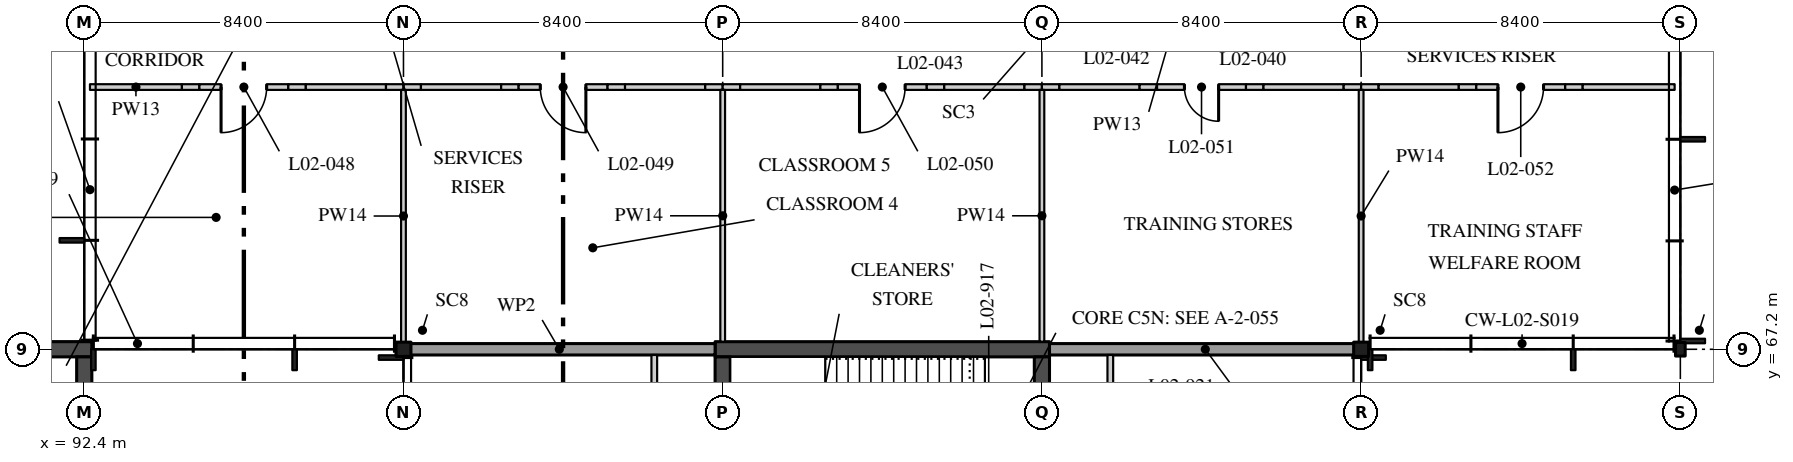
"""IFC4 building model, lengths in metres.
Left out: names, types, materials, properties, quantities, classifications, styles, units other than length and angle.
Written with IfcOpenShell. Run it as: python <this file> out.ifc"""

import sys

from ifc_helpers import new_model, si_unit, direction, frame, frame_2d, origin, origin_2d, place, context, subcontext, project, spatial, rectangle, i_section, extrude, element, fill, save


model = new_model("IFC4")
c1 = context("Model", 3, precision=1e-05, world=origin(), true_north=direction((0.0, 1.0)))
c2 = subcontext(c1, "Body", "Model", "MODEL_VIEW")
j1 = project(units=[si_unit("LENGTHUNIT", "METRE"), si_unit("PLANEANGLEUNIT", "RADIAN")], contexts=[c1])
p1 = place(None, origin())
s1 = spatial("IfcSite", under=j1, at=p1, CompositionType="ELEMENT")
p2 = place(p1, origin())
s2 = spatial("IfcBuilding", under=s1, at=p2, CompositionType="ELEMENT")
p3 = place(p2, frame((0.0, 0.0, 9.9)))
s3 = spatial("IfcBuildingStorey", under=s2, at=p3, CompositionType="ELEMENT", Elevation=9.9)
for number, where, z_axis, x_axis in (
    (1, (100.8, 67.2, 0.0), (0.0, 0.0, 1.0), (1.0, 0.0, 0.0)),
    (2, (126.0, 67.2, 0.0), (0.0, 0.0, 1.0), (1.0, 0.0, 0.0)),
):
    element("IfcColumn", number, at=place(p3, frame(where, z_axis=z_axis, x_axis=x_axis)), inside=s3, PredefinedType="COLUMN", context=c2, shape_type="SweptSolid", body=[
        extrude(i_section(OverallWidth=0.394, OverallDepth=0.376, WebThickness=0.017, FlangeThickness=0.028, FilletRadius=0.015, at=origin_2d()), origin(), (0.0, 0.0, 1.0), 4.37),
    ])
p4 = place(p3, frame((134.4, 67.2, 0.0), z_axis=(0.0, 0.0, 1.0), x_axis=(1.0, 0.0, 0.0)))
e3 = element("IfcColumn", 3, at=p4, inside=s3, PredefinedType="COLUMN", context=c2, shape_type="SweptSolid", body=[
    extrude(i_section(OverallWidth=0.254, OverallDepth=0.356, WebThickness=0.01, FlangeThickness=0.018, FilletRadius=0.015, at=origin_2d()), origin(), (0.0, 0.0, 1.0), 4.37),
])
p5 = place(p3, frame((83.8, 67.2, 0.0), z_axis=(0.0, 0.0, 1.0), x_axis=(1.0, 0.0, 0.0)))
e4 = element("IfcWall", 4, at=p5, inside=s3, PredefinedType="SHEAR", context=c2, shape_type="SweptSolid", body=[
    extrude(rectangle(XDim=8.8, YDim=0.4, at=frame_2d((4.4, 0.0))), origin(), (0.0, 0.0, 1.0), 4.5),
])
p6 = place(p3, frame((92.4, 59.0, 0.0), z_axis=(0.0, 0.0, 1.0), x_axis=(0.0, 1.0, 0.0)))
e5 = element("IfcWall", 5, at=p6, inside=s3, PredefinedType="SHEAR", context=c2, shape_type="SweptSolid", body=[
    extrude(rectangle(XDim=8.0, YDim=0.4, at=frame_2d((4.0, 0.0))), origin(), (0.0, 0.0, 1.0), 4.5),
])
p7 = place(p3, frame((109.0, 67.2, 0.0), z_axis=(0.0, 0.0, 1.0), x_axis=(1.0, 0.0, 0.0)))
e6 = element("IfcWall", 6, at=p7, inside=s3, PredefinedType="SHEAR", context=c2, shape_type="SweptSolid", body=[
    extrude(rectangle(XDim=8.8, YDim=0.4, at=frame_2d((4.4, 0.0))), origin(), (0.0, 0.0, 1.0), 4.37),
])
p8 = place(p3, frame((109.2, 59.0, 0.0), z_axis=(0.0, 0.0, 1.0), x_axis=(0.0, 1.0, 0.0)))
e7 = element("IfcWall", 7, at=p8, inside=s3, PredefinedType="SHEAR", context=c2, shape_type="SweptSolid", body=[
    extrude(rectangle(XDim=8.0, YDim=0.4, at=frame_2d((4.0, 0.0))), origin(), (0.0, 0.0, 1.0), 4.37),
])
p9 = place(p8, frame((2.925, 0.0, 0.0)))
e8 = element("IfcOpeningElement", 8, at=p9, cuts=e7, PredefinedType="OPENING", context=c2, shape_type="SweptSolid", body=[
    extrude(rectangle(XDim=1.2, YDim=2.1, at=frame_2d((0.6, 1.05))), frame((0.0, 0.21, 0.0), z_axis=(0.0, -1.0, 0.0), x_axis=(1.0, 0.0, 0.0)), (0.0, 0.0, 1.0), 0.42),
])
p10 = place(p3, frame((117.6, 59.0, 0.0), z_axis=(0.0, 0.0, 1.0), x_axis=(0.0, 1.0, 0.0)))
e9 = element("IfcWall", 9, at=p10, inside=s3, PredefinedType="SHEAR", context=c2, shape_type="SweptSolid", body=[
    extrude(rectangle(XDim=8.0, YDim=0.4, at=frame_2d((4.0, 0.0))), origin(), (0.0, 0.0, 1.0), 4.37),
])
p11 = place(p10, frame((2.925, 0.0, 0.0)))
e10 = element("IfcOpeningElement", 10, at=p11, cuts=e9, PredefinedType="OPENING", context=c2, shape_type="SweptSolid", body=[
    extrude(rectangle(XDim=1.2, YDim=2.1, at=frame_2d((0.6, 1.05))), frame((0.0, 0.21, 0.0), z_axis=(0.0, -1.0, 0.0), x_axis=(1.0, 0.0, 0.0)), (0.0, 0.0, 1.0), 0.42),
])
p12 = place(p3, frame((119.4, 59.03, 0.0), z_axis=(0.0, 0.0, 1.0), x_axis=(0.0, 1.0, 0.0)))
e11 = element("IfcWall", 11, at=p12, inside=s3, PredefinedType="PARTITIONING", context=c2, shape_type="SweptSolid", body=[
    extrude(rectangle(XDim=8.02, YDim=0.15, at=frame_2d((4.01, 0.0))), origin(), (0.0, 0.0, 1.0), 4.37),
])
p13 = place(p12, frame((1.27, 0.0, 0.0)))
e12 = element("IfcOpeningElement", 12, at=p13, cuts=e11, PredefinedType="OPENING", context=c2, shape_type="SweptSolid", body=[
    extrude(rectangle(XDim=0.9, YDim=2.1, at=frame_2d((0.45, 1.05))), frame((0.0, 0.085, 0.0), z_axis=(0.0, -1.0, 0.0), x_axis=(1.0, 0.0, 0.0)), (0.0, 0.0, 1.0), 0.17),
])
p14 = place(p3, frame((107.4, 59.03, 0.0), z_axis=(0.0, 0.0, 1.0), x_axis=(0.0, 1.0, 0.0)))
e13 = element("IfcWall", 13, at=p14, inside=s3, PredefinedType="PARTITIONING", context=c2, shape_type="SweptSolid", body=[
    extrude(rectangle(XDim=8.02, YDim=0.15, at=frame_2d((4.01, 0.0))), origin(), (0.0, 0.0, 1.0), 4.37),
])
p15 = place(p3, frame((92.55, 74.1, 0.0), z_axis=(0.0, 0.0, 1.0), x_axis=(1.0, 0.0, 0.0)))
e14 = element("IfcWall", 14, at=p15, inside=s3, PredefinedType="PARTITIONING", context=c2, shape_type="SweptSolid", body=[
    extrude(rectangle(XDim=2.42, YDim=0.15, at=frame_2d((1.21, 0.0))), origin(), (0.0, 0.0, 1.0), 4.37),
])
p16 = place(p3, frame((94.97, 74.1, 0.0), z_axis=(0.0, 0.0, 1.0), x_axis=(1.0, 0.0, 0.0)))
e15 = element("IfcWall", 15, at=p16, inside=s3, PredefinedType="PARTITIONING", context=c2, shape_type="SweptSolid", body=[
    extrude(rectangle(XDim=0.46, YDim=0.15, at=frame_2d((0.23, 0.0))), origin(), (0.0, 0.0, 1.0), 3.895),
])
p17 = place(p3, frame((95.43, 74.1, 0.0), z_axis=(0.0, 0.0, 1.0), x_axis=(1.0, 0.0, 0.0)))
e16 = element("IfcWall", 16, at=p17, inside=s3, PredefinedType="PARTITIONING", context=c2, shape_type="SweptSolid", body=[
    extrude(rectangle(XDim=2.34, YDim=0.15, at=frame_2d((1.17, 0.0))), origin(), (0.0, 0.0, 1.0), 4.37),
])
p18 = place(p17, frame((0.57, 0.0, 0.0)))
e17 = element("IfcOpeningElement", 17, at=p18, cuts=e16, PredefinedType="OPENING", context=c2, shape_type="SweptSolid", body=[
    extrude(rectangle(XDim=1.2, YDim=2.4, at=frame_2d((0.6, 1.2))), frame((0.0, 0.085, 0.0), z_axis=(0.0, -1.0, 0.0), x_axis=(1.0, 0.0, 0.0)), (0.0, 0.0, 1.0), 0.17),
])
p19 = place(p3, frame((97.77, 74.1, 0.0), z_axis=(0.0, 0.0, 1.0), x_axis=(1.0, 0.0, 0.0)))
e18 = element("IfcWall", 18, at=p19, inside=s3, PredefinedType="PARTITIONING", context=c2, shape_type="SweptSolid", body=[
    extrude(rectangle(XDim=0.46, YDim=0.15, at=frame_2d((0.23, 0.0))), origin(), (0.0, 0.0, 1.0), 3.895),
])
p20 = place(p3, frame((98.23, 74.1, 0.0), z_axis=(0.0, 0.0, 1.0), x_axis=(1.0, 0.0, 0.0)))
e19 = element("IfcWall", 19, at=p20, inside=s3, PredefinedType="PARTITIONING", context=c2, shape_type="SweptSolid", body=[
    extrude(rectangle(XDim=2.11, YDim=0.15, at=frame_2d((1.055, 0.0))), origin(), (0.0, 0.0, 1.0), 4.37),
])
for number, where, z_axis, x_axis in (
    (20, (100.34, 74.1, 0.0), (0.0, 0.0, 1.0), (1.0, 0.0, 0.0)),
    (21, (100.8, 74.1, 0.0), (0.0, 0.0, 1.0), (1.0, 0.0, 0.0)),
):
    element("IfcWall", number, at=place(p3, frame(where, z_axis=z_axis, x_axis=x_axis)), inside=s3, PredefinedType="PARTITIONING", context=c2, shape_type="SweptSolid", body=[
        extrude(rectangle(XDim=0.46, YDim=0.15, at=frame_2d((0.23, 0.0))), origin(), (0.0, 0.0, 1.0), 3.746),
    ])
p21 = place(p3, frame((101.26, 74.1, 0.0), z_axis=(0.0, 0.0, 1.0), x_axis=(1.0, 0.0, 0.0)))
e22 = element("IfcWall", 22, at=p21, inside=s3, PredefinedType="PARTITIONING", context=c2, shape_type="SweptSolid", body=[
    extrude(rectangle(XDim=2.11, YDim=0.15, at=frame_2d((1.055, 0.0))), origin(), (0.0, 0.0, 1.0), 4.37),
])
p22 = place(p3, frame((103.37, 74.1, 0.0), z_axis=(0.0, 0.0, 1.0), x_axis=(1.0, 0.0, 0.0)))
e23 = element("IfcWall", 23, at=p22, inside=s3, PredefinedType="PARTITIONING", context=c2, shape_type="SweptSolid", body=[
    extrude(rectangle(XDim=0.46, YDim=0.15, at=frame_2d((0.23, 0.0))), origin(), (0.0, 0.0, 1.0), 3.895),
])
p23 = place(p3, frame((103.83, 74.1, 0.0), z_axis=(0.0, 0.0, 1.0), x_axis=(1.0, 0.0, 0.0)))
e24 = element("IfcWall", 24, at=p23, inside=s3, PredefinedType="PARTITIONING", context=c2, shape_type="SweptSolid", body=[
    extrude(rectangle(XDim=2.34, YDim=0.15, at=frame_2d((1.17, 0.0))), origin(), (0.0, 0.0, 1.0), 4.37),
])
p24 = place(p23, frame((0.57, 0.0, 0.0)))
e25 = element("IfcOpeningElement", 25, at=p24, cuts=e24, PredefinedType="OPENING", context=c2, shape_type="SweptSolid", body=[
    extrude(rectangle(XDim=1.2, YDim=2.4, at=frame_2d((0.6, 1.2))), frame((0.0, 0.085, 0.0), z_axis=(0.0, -1.0, 0.0), x_axis=(1.0, 0.0, 0.0)), (0.0, 0.0, 1.0), 0.17),
])
p25 = place(p3, frame((106.17, 74.1, 0.0), z_axis=(0.0, 0.0, 1.0), x_axis=(1.0, 0.0, 0.0)))
e26 = element("IfcWall", 26, at=p25, inside=s3, PredefinedType="PARTITIONING", context=c2, shape_type="SweptSolid", body=[
    extrude(rectangle(XDim=0.46, YDim=0.15, at=frame_2d((0.23, 0.0))), origin(), (0.0, 0.0, 1.0), 3.895),
])
p26 = place(p3, frame((106.63, 74.1, 0.0), z_axis=(0.0, 0.0, 1.0), x_axis=(1.0, 0.0, 0.0)))
e27 = element("IfcWall", 27, at=p26, inside=s3, PredefinedType="PARTITIONING", context=c2, shape_type="SweptSolid", body=[
    extrude(rectangle(XDim=2.11, YDim=0.15, at=frame_2d((1.055, 0.0))), origin(), (0.0, 0.0, 1.0), 4.37),
])
for number, where, z_axis, x_axis in (
    (28, (108.74, 74.1, 0.0), (0.0, 0.0, 1.0), (1.0, 0.0, 0.0)),
    (29, (109.2, 74.1, 0.0), (0.0, 0.0, 1.0), (1.0, 0.0, 0.0)),
):
    element("IfcWall", number, at=place(p3, frame(where, z_axis=z_axis, x_axis=x_axis)), inside=s3, PredefinedType="PARTITIONING", context=c2, shape_type="SweptSolid", body=[
        extrude(rectangle(XDim=0.46, YDim=0.15, at=frame_2d((0.23, 0.0))), origin(), (0.0, 0.0, 1.0), 3.746),
    ])
p27 = place(p3, frame((109.66, 74.1, 0.0), z_axis=(0.0, 0.0, 1.0), x_axis=(1.0, 0.0, 0.0)))
e30 = element("IfcWall", 30, at=p27, inside=s3, PredefinedType="PARTITIONING", context=c2, shape_type="SweptSolid", body=[
    extrude(rectangle(XDim=2.11, YDim=0.15, at=frame_2d((1.055, 0.0))), origin(), (0.0, 0.0, 1.0), 4.37),
])
p28 = place(p3, frame((111.77, 74.1, 0.0), z_axis=(0.0, 0.0, 1.0), x_axis=(1.0, 0.0, 0.0)))
e31 = element("IfcWall", 31, at=p28, inside=s3, PredefinedType="PARTITIONING", context=c2, shape_type="SweptSolid", body=[
    extrude(rectangle(XDim=0.46, YDim=0.15, at=frame_2d((0.23, 0.0))), origin(), (0.0, 0.0, 1.0), 3.895),
])
p29 = place(p3, frame((112.23, 74.1, 0.0), z_axis=(0.0, 0.0, 1.0), x_axis=(1.0, 0.0, 0.0)))
e32 = element("IfcWall", 32, at=p29, inside=s3, PredefinedType="PARTITIONING", context=c2, shape_type="SweptSolid", body=[
    extrude(rectangle(XDim=2.34, YDim=0.15, at=frame_2d((1.17, 0.0))), origin(), (0.0, 0.0, 1.0), 4.37),
])
p30 = place(p29, frame((0.57, 0.0, 0.0)))
e33 = element("IfcOpeningElement", 33, at=p30, cuts=e32, PredefinedType="OPENING", context=c2, shape_type="SweptSolid", body=[
    extrude(rectangle(XDim=1.2, YDim=2.4, at=frame_2d((0.6, 1.2))), frame((0.0, 0.085, 0.0), z_axis=(0.0, -1.0, 0.0), x_axis=(1.0, 0.0, 0.0)), (0.0, 0.0, 1.0), 0.17),
])
p31 = place(p3, frame((114.57, 74.1, 0.0), z_axis=(0.0, 0.0, 1.0), x_axis=(1.0, 0.0, 0.0)))
e34 = element("IfcWall", 34, at=p31, inside=s3, PredefinedType="PARTITIONING", context=c2, shape_type="SweptSolid", body=[
    extrude(rectangle(XDim=0.46, YDim=0.15, at=frame_2d((0.23, 0.0))), origin(), (0.0, 0.0, 1.0), 3.895),
])
p32 = place(p3, frame((115.03, 74.1, 0.0), z_axis=(0.0, 0.0, 1.0), x_axis=(1.0, 0.0, 0.0)))
e35 = element("IfcWall", 35, at=p32, inside=s3, PredefinedType="PARTITIONING", context=c2, shape_type="SweptSolid", body=[
    extrude(rectangle(XDim=2.11, YDim=0.15, at=frame_2d((1.055, 0.0))), origin(), (0.0, 0.0, 1.0), 4.37),
])
p33 = place(p3, frame((117.14, 74.1, 0.0), z_axis=(0.0, 0.0, 1.0), x_axis=(1.0, 0.0, 0.0)))
e36 = element("IfcWall", 36, at=p33, inside=s3, PredefinedType="PARTITIONING", context=c2, shape_type="SweptSolid", body=[
    extrude(rectangle(XDim=0.46, YDim=0.15, at=frame_2d((0.23, 0.0))), origin(), (0.0, 0.0, 1.0), 3.746),
])
p34 = place(p3, frame((117.6, 74.1, 0.0), z_axis=(0.0, 0.0, 1.0), x_axis=(1.0, 0.0, 0.0)))
e37 = element("IfcWall", 37, at=p34, inside=s3, PredefinedType="PARTITIONING", context=c2, shape_type="SweptSolid", body=[
    extrude(rectangle(XDim=0.46, YDim=0.15, at=frame_2d((0.23, 0.0))), origin(), (0.0, 0.0, 1.0), 3.746),
])
p35 = place(p3, frame((118.06, 74.1, 0.0), z_axis=(0.0, 0.0, 1.0), x_axis=(1.0, 0.0, 0.0)))
e38 = element("IfcWall", 38, at=p35, inside=s3, PredefinedType="PARTITIONING", context=c2, shape_type="SweptSolid", body=[
    extrude(rectangle(XDim=2.11, YDim=0.15, at=frame_2d((1.055, 0.0))), origin(), (0.0, 0.0, 1.0), 4.37),
])
p36 = place(p3, frame((120.17, 74.1, 0.0), z_axis=(0.0, 0.0, 1.0), x_axis=(1.0, 0.0, 0.0)))
e39 = element("IfcWall", 39, at=p36, inside=s3, PredefinedType="PARTITIONING", context=c2, shape_type="SweptSolid", body=[
    extrude(rectangle(XDim=0.46, YDim=0.15, at=frame_2d((0.23, 0.0))), origin(), (0.0, 0.0, 1.0), 3.895),
])
p37 = place(p3, frame((120.63, 74.1, 0.0), z_axis=(0.0, 0.0, 1.0), x_axis=(1.0, 0.0, 0.0)))
e40 = element("IfcWall", 40, at=p37, inside=s3, PredefinedType="PARTITIONING", context=c2, shape_type="SweptSolid", body=[
    extrude(rectangle(XDim=2.34, YDim=0.15, at=frame_2d((1.17, 0.0))), origin(), (0.0, 0.0, 1.0), 4.37),
])
p38 = place(p37, frame((0.72, 0.0, 0.0)))
e41 = element("IfcOpeningElement", 41, at=p38, cuts=e40, PredefinedType="OPENING", context=c2, shape_type="SweptSolid", body=[
    extrude(rectangle(XDim=0.9, YDim=2.1, at=frame_2d((0.45, 1.05))), frame((0.0, 0.085, 0.0), z_axis=(0.0, -1.0, 0.0), x_axis=(1.0, 0.0, 0.0)), (0.0, 0.0, 1.0), 0.17),
])
p39 = place(p3, frame((122.97, 74.1, 0.0), z_axis=(0.0, 0.0, 1.0), x_axis=(1.0, 0.0, 0.0)))
e42 = element("IfcWall", 42, at=p39, inside=s3, PredefinedType="PARTITIONING", context=c2, shape_type="SweptSolid", body=[
    extrude(rectangle(XDim=0.46, YDim=0.15, at=frame_2d((0.23, 0.0))), origin(), (0.0, 0.0, 1.0), 3.895),
])
p40 = place(p3, frame((123.43, 74.1, 0.0), z_axis=(0.0, 0.0, 1.0), x_axis=(1.0, 0.0, 0.0)))
e43 = element("IfcWall", 43, at=p40, inside=s3, PredefinedType="PARTITIONING", context=c2, shape_type="SweptSolid", body=[
    extrude(rectangle(XDim=2.11, YDim=0.15, at=frame_2d((1.055, 0.0))), origin(), (0.0, 0.0, 1.0), 4.37),
])
for number, where, z_axis, x_axis in (
    (44, (125.54, 74.1, 0.0), (0.0, 0.0, 1.0), (1.0, 0.0, 0.0)),
    (45, (126.0, 74.1, 0.0), (0.0, 0.0, 1.0), (1.0, 0.0, 0.0)),
):
    element("IfcWall", number, at=place(p3, frame(where, z_axis=z_axis, x_axis=x_axis)), inside=s3, PredefinedType="PARTITIONING", context=c2, shape_type="SweptSolid", body=[
        extrude(rectangle(XDim=0.46, YDim=0.15, at=frame_2d((0.23, 0.0))), origin(), (0.0, 0.0, 1.0), 3.746),
    ])
p41 = place(p3, frame((126.46, 74.1, 0.0), z_axis=(0.0, 0.0, 1.0), x_axis=(1.0, 0.0, 0.0)))
e46 = element("IfcWall", 46, at=p41, inside=s3, PredefinedType="PARTITIONING", context=c2, shape_type="SweptSolid", body=[
    extrude(rectangle(XDim=2.11, YDim=0.15, at=frame_2d((1.055, 0.0))), origin(), (0.0, 0.0, 1.0), 4.37),
])
p42 = place(p3, frame((128.57, 74.1, 0.0), z_axis=(0.0, 0.0, 1.0), x_axis=(1.0, 0.0, 0.0)))
e47 = element("IfcWall", 47, at=p42, inside=s3, PredefinedType="PARTITIONING", context=c2, shape_type="SweptSolid", body=[
    extrude(rectangle(XDim=0.46, YDim=0.15, at=frame_2d((0.23, 0.0))), origin(), (0.0, 0.0, 1.0), 3.895),
])
p43 = place(p3, frame((129.03, 74.1, 0.0), z_axis=(0.0, 0.0, 1.0), x_axis=(1.0, 0.0, 0.0)))
e48 = element("IfcWall", 48, at=p43, inside=s3, PredefinedType="PARTITIONING", context=c2, shape_type="SweptSolid", body=[
    extrude(rectangle(XDim=2.34, YDim=0.15, at=frame_2d((1.17, 0.0))), origin(), (0.0, 0.0, 1.0), 4.37),
])
p44 = place(p43, frame((0.57, 0.0, 0.0)))
e49 = element("IfcOpeningElement", 49, at=p44, cuts=e48, PredefinedType="OPENING", context=c2, shape_type="SweptSolid", body=[
    extrude(rectangle(XDim=1.2, YDim=2.4, at=frame_2d((0.6, 1.2))), frame((0.0, 0.085, 0.0), z_axis=(0.0, -1.0, 0.0), x_axis=(1.0, 0.0, 0.0)), (0.0, 0.0, 1.0), 0.17),
])
p45 = place(p3, frame((131.37, 74.1, 0.0), z_axis=(0.0, 0.0, 1.0), x_axis=(1.0, 0.0, 0.0)))
e50 = element("IfcWall", 50, at=p45, inside=s3, PredefinedType="PARTITIONING", context=c2, shape_type="SweptSolid", body=[
    extrude(rectangle(XDim=0.46, YDim=0.15, at=frame_2d((0.23, 0.0))), origin(), (0.0, 0.0, 1.0), 3.895),
])
p46 = place(p3, frame((131.83, 74.1, 0.0), z_axis=(0.0, 0.0, 1.0), x_axis=(1.0, 0.0, 0.0)))
e51 = element("IfcWall", 51, at=p46, inside=s3, PredefinedType="PARTITIONING", context=c2, shape_type="SweptSolid", body=[
    extrude(rectangle(XDim=2.42, YDim=0.15, at=frame_2d((1.21, 0.0))), origin(), (0.0, 0.0, 1.0), 4.37),
])
p47 = place(p3, frame((100.8, 67.388, 0.0), z_axis=(0.0, 0.0, 1.0), x_axis=(0.0, 1.0, 0.0)))
e52 = element("IfcWall", 52, at=p47, inside=s3, PredefinedType="PARTITIONING", context=c2, shape_type="SweptSolid", body=[
    extrude(rectangle(XDim=6.637, YDim=0.125, at=frame_2d((3.318, 0.0))), origin(), (0.0, 0.0, 1.0), 3.746),
])
for number, where, z_axis, x_axis in (
    (53, (109.2, 67.4, 0.0), (0.0, 0.0, 1.0), (0.0, 1.0, 0.0)),
    (54, (117.6, 67.4, 0.0), (0.0, 0.0, 1.0), (0.0, 1.0, 0.0)),
):
    element("IfcWall", number, at=place(p3, frame(where, z_axis=z_axis, x_axis=x_axis)), inside=s3, PredefinedType="PARTITIONING", context=c2, shape_type="SweptSolid", body=[
        extrude(rectangle(XDim=6.625, YDim=0.125, at=frame_2d((3.312, 0.0))), origin(), (0.0, 0.0, 1.0), 3.746),
    ])
p48 = place(p3, frame((126.0, 67.388, 0.0), z_axis=(0.0, 0.0, 1.0), x_axis=(0.0, 1.0, 0.0)))
e55 = element("IfcWall", 55, at=p48, inside=s3, PredefinedType="PARTITIONING", context=c2, shape_type="SweptSolid", body=[
    extrude(rectangle(XDim=6.637, YDim=0.125, at=frame_2d((3.318, 0.0))), origin(), (0.0, 0.0, 1.0), 3.746),
])
for number, where, z_axis, x_axis in (
    (56, (125.999, 67.2, 0.0), (0.0, 0.0, 1.0), (-1.0, 0.0, 0.0)),
    (57, (109.0, 67.2, 0.0), (0.0, 0.0, 1.0), (-1.0, 0.0, 0.0)),
):
    element("IfcWall", number, at=place(p3, frame(where, z_axis=z_axis, x_axis=x_axis)), inside=s3, PredefinedType="SOLIDWALL", context=c2, shape_type="SweptSolid", body=[
        extrude(rectangle(XDim=8.198, YDim=0.3, at=frame_2d((4.099, 0.0))), origin(), (0.0, 0.0, 1.0), 3.746),
    ])
p49 = place(p18, frame((1.2, 0.0, 0.0), z_axis=(0.0, 0.0, 1.0), x_axis=(-1.0, 0.0, 0.0)))
e58 = element("IfcDoor", 58, at=p49, inside=s3, OperationType="SINGLE_SWING_LEFT", PredefinedType="DOOR", context=c2, shape_type="SweptSolid", body=[
    extrude(rectangle(XDim=1.2, YDim=2.4, at=frame_2d((0.6, 1.2))), frame((0.0, 0.025, 0.0), z_axis=(0.0, -1.0, 0.0), x_axis=(1.0, 0.0, 0.0)), (0.0, 0.0, 1.0), 0.05),
])
fill(e17, e58)
p50 = place(p24, frame((1.2, 0.0, 0.0), z_axis=(0.0, 0.0, 1.0), x_axis=(-1.0, 0.0, 0.0)))
e59 = element("IfcDoor", 59, at=p50, inside=s3, OperationType="SINGLE_SWING_RIGHT", PredefinedType="DOOR", context=c2, shape_type="SweptSolid", body=[
    extrude(rectangle(XDim=1.2, YDim=2.4, at=frame_2d((0.6, 1.2))), frame((0.0, 0.025, 0.0), z_axis=(0.0, -1.0, 0.0), x_axis=(1.0, 0.0, 0.0)), (0.0, 0.0, 1.0), 0.05),
])
fill(e25, e59)
p51 = place(p30, frame((1.2, 0.0, 0.0), z_axis=(0.0, 0.0, 1.0), x_axis=(-1.0, 0.0, 0.0)))
e60 = element("IfcDoor", 60, at=p51, inside=s3, OperationType="SINGLE_SWING_LEFT", PredefinedType="DOOR", context=c2, shape_type="SweptSolid", body=[
    extrude(rectangle(XDim=1.2, YDim=2.4, at=frame_2d((0.6, 1.2))), frame((0.0, 0.025, 0.0), z_axis=(0.0, -1.0, 0.0), x_axis=(1.0, 0.0, 0.0)), (0.0, 0.0, 1.0), 0.05),
])
fill(e33, e60)
p52 = place(p38, frame((0.9, 0.0, 0.0), z_axis=(0.0, 0.0, 1.0), x_axis=(-1.0, 0.0, 0.0)))
e61 = element("IfcDoor", 61, at=p52, inside=s3, OperationType="SINGLE_SWING_RIGHT", PredefinedType="DOOR", context=c2, shape_type="SweptSolid", body=[
    extrude(rectangle(XDim=0.9, YDim=2.1, at=frame_2d((0.45, 1.05))), frame((0.0, 0.025, 0.0), z_axis=(0.0, -1.0, 0.0), x_axis=(1.0, 0.0, 0.0)), (0.0, 0.0, 1.0), 0.05),
])
fill(e41, e61)
p53 = place(p44, frame((1.2, 0.0, 0.0), z_axis=(0.0, 0.0, 1.0), x_axis=(-1.0, 0.0, 0.0)))
e62 = element("IfcDoor", 62, at=p53, inside=s3, OperationType="SINGLE_SWING_LEFT", PredefinedType="DOOR", context=c2, shape_type="SweptSolid", body=[
    extrude(rectangle(XDim=1.2, YDim=2.4, at=frame_2d((0.6, 1.2))), frame((0.0, 0.025, 0.0), z_axis=(0.0, -1.0, 0.0), x_axis=(1.0, 0.0, 0.0)), (0.0, 0.0, 1.0), 0.05),
])
fill(e49, e62)
save(model, sys.argv[1])
